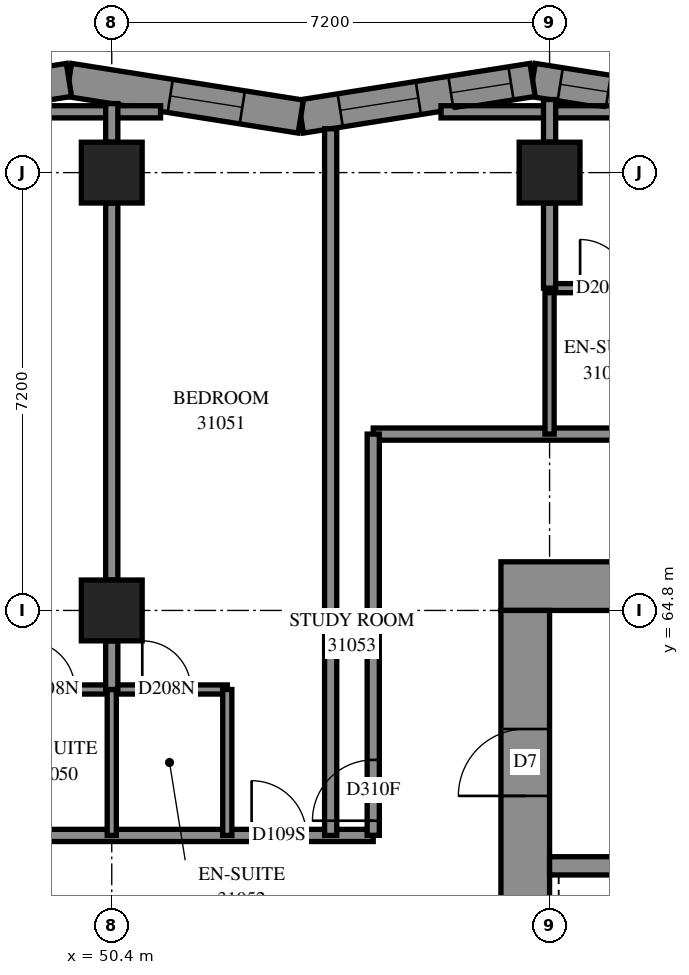
"""IFC4 building model, lengths in metres.
Left out: names, types, materials, properties, quantities, classifications, styles, units other than length and angle.
Written with IfcOpenShell. Run it as: python <this file> out.ifc"""

import sys

from ifc_helpers import new_model, si_unit, direction, frame, frame_2d, origin, origin_2d, place, context, subcontext, project, spatial, polyline, rectangle, outline, extrude, element, fill, save


model = new_model("IFC4")
c1 = context("Model", 3, precision=1e-05, world=origin(), true_north=direction((0.0, 1.0)))
c2 = subcontext(c1, "Body", "Model", "MODEL_VIEW")
j1 = project(units=[si_unit("LENGTHUNIT", "METRE"), si_unit("PLANEANGLEUNIT", "RADIAN")], contexts=[c1])
p1 = place(None, origin())
s1 = spatial("IfcSite", under=j1, at=p1, CompositionType="ELEMENT")
p2 = place(p1, origin())
s2 = spatial("IfcBuilding", under=s1, at=p2, CompositionType="ELEMENT")
p3 = place(p2, frame((0.0, 0.0, 115.2)))
s3 = spatial("IfcBuildingStorey", under=s2, at=p3, CompositionType="ELEMENT", Elevation=115.2)
for number, where, z_axis, x_axis in (
    (1, (50.4, 64.8, 0.0), (0.0, 0.0, 1.0), (1.0, 0.0, 0.0)),
    (2, (50.4, 72.0, 0.0), (0.0, 0.0, 1.0), (1.0, 0.0, 0.0)),
    (3, (57.6, 72.0, 0.0), (0.0, 0.0, 1.0), (1.0, 0.0, 0.0)),
):
    element("IfcColumn", number, at=place(p3, frame(where, z_axis=z_axis, x_axis=x_axis)), inside=s3, PredefinedType="COLUMN", context=c2, shape_type="SweptSolid", body=[
        extrude(rectangle(XDim=1.0, YDim=1.0, at=origin_2d()), origin(), (0.0, 0.0, 1.0), 3.1),
    ])
p4 = place(p3, frame((56.8, 65.2, -0.3), z_axis=(0.0, 0.0, 1.0), x_axis=(1.0, 0.0, 0.0)))
e4 = element("IfcWall", 4, at=p4, inside=s3, PredefinedType="SHEAR", context=c2, shape_type="SweptSolid", body=[
    extrude(rectangle(XDim=16.0, YDim=0.8, at=frame_2d((8.0, 0.0))), origin(), (0.0, 0.0, 1.0), 2.7),
])
p5 = place(p4, frame((10.8, 0.0, 0.3)))
e5 = element("IfcOpeningElement", 5, at=p5, cuts=e4, PredefinedType="OPENING", context=c2, shape_type="SweptSolid", body=[
    extrude(rectangle(XDim=0.8, YDim=2.1, at=frame_2d((0.4, 1.05))), frame((0.0, 0.41, 0.0), z_axis=(0.0, -1.0, 0.0), x_axis=(1.0, 0.0, 0.0)), (0.0, 0.0, 1.0), 0.82),
])
p6 = place(p3, frame((57.2, 50.4, -0.3), z_axis=(0.0, 0.0, 1.0), x_axis=(0.0, 1.0, 0.0)))
e6 = element("IfcWall", 6, at=p6, inside=s3, PredefinedType="SHEAR", context=c2, shape_type="SweptSolid", body=[
    extrude(rectangle(XDim=14.4, YDim=0.8, at=frame_2d((7.2, 0.0))), origin(), (0.0, 0.0, 1.0), 2.7),
])
p7 = place(p6, frame((4.55, 0.0, 0.3)))
e7 = element("IfcOpeningElement", 7, at=p7, cuts=e6, PredefinedType="OPENING", context=c2, shape_type="SweptSolid", body=[
    extrude(rectangle(XDim=1.1, YDim=2.1, at=frame_2d((0.55, 1.05))), frame((0.0, 0.41, 0.0), z_axis=(0.0, -1.0, 0.0), x_axis=(1.0, 0.0, 0.0)), (0.0, 0.0, 1.0), 0.82),
])
p8 = place(p6, frame((11.35, 0.0, 0.3)))
e8 = element("IfcOpeningElement", 8, at=p8, cuts=e6, PredefinedType="OPENING", context=c2, shape_type="SweptSolid", body=[
    extrude(rectangle(XDim=1.1, YDim=2.1, at=frame_2d((0.55, 1.05))), frame((0.0, 0.41, 0.0), z_axis=(0.0, -1.0, 0.0), x_axis=(1.0, 0.0, 0.0)), (0.0, 0.0, 1.0), 0.82),
])
p9 = place(p3, frame((57.6, 60.6, 0.0), z_axis=(0.0, 0.0, 1.0), x_axis=(1.0, 0.0, 0.0)))
e9 = element("IfcWall", 9, at=p9, inside=s3, PredefinedType="SOLIDWALL", context=c2, shape_type="SweptSolid", body=[
    extrude(rectangle(XDim=7.2, YDim=0.3, at=frame_2d((3.6, 0.0))), origin(), (0.0, 0.0, 1.0), 3.1),
])
p10 = place(p3, frame((61.133, 72.922, 0.0), z_axis=(0.0, 0.0, 1.0), x_axis=(-0.9877213372, 0.1562259905, 0.0)))
e10 = element("IfcWall", 10, at=p10, inside=s3, PredefinedType="SOLIDWALL", context=c2, shape_type="SweptSolid", body=[
    extrude(outline(polyline([(0.043, -0.275), (3.903, -0.275), (3.816, 0.275), (-0.043, 0.275), (0.043, -0.275)])), origin(), (0.0, 0.0, 1.0), 3.1),
])
p11 = place(p10, frame((0.508, 0.0, 0.5)))
e11 = element("IfcOpeningElement", 11, at=p11, cuts=e10, PredefinedType="OPENING", context=c2, shape_type="SweptSolid", body=[
    extrude(rectangle(XDim=1.3, YDim=2.45, at=frame_2d((0.65, 1.225))), frame((0.0, 0.285, 0.0), z_axis=(0.0, -1.0, 0.0), x_axis=(1.0, 0.0, 0.0)), (0.0, 0.0, 1.0), 0.57),
])
p12 = place(p10, frame((2.6, 0.0, 0.45)))
e12 = element("IfcOpeningElement", 12, at=p12, cuts=e10, PredefinedType="OPENING", context=c2, shape_type="SweptSolid", body=[
    extrude(rectangle(XDim=0.8, YDim=2.5, at=frame_2d((0.4, 1.25))), frame((0.0, 0.285, 0.0), z_axis=(0.0, -1.0, 0.0), x_axis=(1.0, 0.0, 0.0)), (0.0, 0.0, 1.0), 0.57),
])
p13 = place(p3, frame((57.321, 73.525, 0.0), z_axis=(0.0, 0.0, 1.0), x_axis=(-0.9877213372, -0.1562259905, 0.0)))
e13 = element("IfcWall", 13, at=p13, inside=s3, PredefinedType="SOLIDWALL", context=c2, shape_type="SweptSolid", body=[
    extrude(outline(polyline([(-0.043, -0.275), (3.816, -0.275), (3.903, 0.275), (0.043, 0.275), (-0.043, -0.275)])), origin(), (0.0, 0.0, 1.0), 3.1),
])
p14 = place(p13, frame((1.903, 0.0, 0.5)))
e14 = element("IfcOpeningElement", 14, at=p14, cuts=e13, PredefinedType="OPENING", context=c2, shape_type="SweptSolid", body=[
    extrude(rectangle(XDim=1.3, YDim=2.45, at=frame_2d((0.65, 1.225))), frame((0.0, 0.285, 0.0), z_axis=(0.0, -1.0, 0.0), x_axis=(1.0, 0.0, 0.0)), (0.0, 0.0, 1.0), 0.57),
])
p15 = place(p13, frame((0.36, 0.0, 0.45)))
e15 = element("IfcOpeningElement", 15, at=p15, cuts=e13, PredefinedType="OPENING", context=c2, shape_type="SweptSolid", body=[
    extrude(rectangle(XDim=1.0, YDim=2.5, at=frame_2d((0.5, 1.25))), frame((0.0, 0.285, 0.0), z_axis=(0.0, -1.0, 0.0), x_axis=(1.0, 0.0, 0.0)), (0.0, 0.0, 1.0), 0.57),
])
p16 = place(p3, frame((53.509, 72.922, 0.0), z_axis=(0.0, 0.0, 1.0), x_axis=(-0.9877213372, 0.1562259905, 0.0)))
e16 = element("IfcWall", 16, at=p16, inside=s3, PredefinedType="SOLIDWALL", context=c2, shape_type="SweptSolid", body=[
    extrude(outline(polyline([(0.043, -0.275), (3.903, -0.275), (3.816, 0.275), (-0.043, 0.275), (0.043, -0.275)])), origin(), (0.0, 0.0, 1.0), 3.1),
])
p17 = place(p16, frame((0.974, 0.0, 0.5)))
e17 = element("IfcOpeningElement", 17, at=p17, cuts=e16, PredefinedType="OPENING", context=c2, shape_type="SweptSolid", body=[
    extrude(rectangle(XDim=1.2, YDim=2.45, at=frame_2d((0.6, 1.225))), frame((0.0, 0.285, 0.0), z_axis=(0.0, -1.0, 0.0), x_axis=(1.0, 0.0, 0.0)), (0.0, 0.0, 1.0), 0.57),
])
p18 = place(p3, frame((49.696, 73.525, 0.0), z_axis=(0.0, 0.0, 1.0), x_axis=(-0.9877213372, -0.1562259905, 0.0)))
e18 = element("IfcWall", 18, at=p18, inside=s3, PredefinedType="SOLIDWALL", context=c2, shape_type="SweptSolid", body=[
    extrude(outline(polyline([(-0.043, -0.275), (3.816, -0.275), (3.903, 0.275), (0.043, 0.275), (-0.043, -0.275)])), origin(), (0.0, 0.0, 1.0), 3.1),
])
p19 = place(p18, frame((0.36, 0.0, 0.45)))
e19 = element("IfcOpeningElement", 19, at=p19, cuts=e18, PredefinedType="OPENING", context=c2, shape_type="SweptSolid", body=[
    extrude(rectangle(XDim=1.0, YDim=2.5, at=frame_2d((0.5, 1.25))), frame((0.0, 0.285, 0.0), z_axis=(0.0, -1.0, 0.0), x_axis=(1.0, 0.0, 0.0)), (0.0, 0.0, 1.0), 0.57),
])
p20 = place(p18, frame((2.04, 0.0, 0.45)))
e20 = element("IfcOpeningElement", 20, at=p20, cuts=e18, PredefinedType="OPENING", context=c2, shape_type="SweptSolid", body=[
    extrude(rectangle(XDim=0.8, YDim=2.5, at=frame_2d((0.4, 1.25))), frame((0.0, 0.285, 0.0), z_axis=(0.0, -1.0, 0.0), x_axis=(1.0, 0.0, 0.0)), (0.0, 0.0, 1.0), 0.57),
])
p21 = place(p3, frame((33.502, 61.1, 0.0), z_axis=(0.0, 0.0, 1.0), x_axis=(1.0, 0.0, 0.0)))
e21 = element("IfcWall", 21, at=p21, inside=s3, PredefinedType="PARTITIONING", context=c2, shape_type="SweptSolid", body=[
    extrude(rectangle(XDim=21.198, YDim=0.2, at=frame_2d((10.599, 0.0))), origin(), (0.0, 0.0, 1.0), 3.1),
])
p22 = place(p21, frame((4.798, 0.0, 0.0)))
e22 = element("IfcOpeningElement", 22, at=p22, cuts=e21, PredefinedType="OPENING", context=c2, shape_type="SweptSolid", body=[
    extrude(rectangle(XDim=0.9, YDim=2.1, at=frame_2d((0.45, 1.05))), frame((0.0, 0.11, 0.0), z_axis=(0.0, -1.0, 0.0), x_axis=(1.0, 0.0, 0.0)), (0.0, 0.0, 1.0), 0.22),
])
p23 = place(p21, frame((6.498, 0.0, 0.0)))
e23 = element("IfcOpeningElement", 23, at=p23, cuts=e21, PredefinedType="OPENING", context=c2, shape_type="SweptSolid", body=[
    extrude(rectangle(XDim=0.9, YDim=2.1, at=frame_2d((0.45, 1.05))), frame((0.0, 0.11, 0.0), z_axis=(0.0, -1.0, 0.0), x_axis=(1.0, 0.0, 0.0)), (0.0, 0.0, 1.0), 0.22),
])
p24 = place(p21, frame((11.998, 0.0, 0.0)))
e24 = element("IfcOpeningElement", 24, at=p24, cuts=e21, PredefinedType="OPENING", context=c2, shape_type="SweptSolid", body=[
    extrude(rectangle(XDim=0.9, YDim=2.1, at=frame_2d((0.45, 1.05))), frame((0.0, 0.11, 0.0), z_axis=(0.0, -1.0, 0.0), x_axis=(1.0, 0.0, 0.0)), (0.0, 0.0, 1.0), 0.22),
])
p25 = place(p21, frame((13.698, 0.0, 0.0)))
e25 = element("IfcOpeningElement", 25, at=p25, cuts=e21, PredefinedType="OPENING", context=c2, shape_type="SweptSolid", body=[
    extrude(rectangle(XDim=0.9, YDim=2.1, at=frame_2d((0.45, 1.05))), frame((0.0, 0.11, 0.0), z_axis=(0.0, -1.0, 0.0), x_axis=(1.0, 0.0, 0.0)), (0.0, 0.0, 1.0), 0.22),
])
p26 = place(p21, frame((19.198, 0.0, 0.0)))
e26 = element("IfcOpeningElement", 26, at=p26, cuts=e21, PredefinedType="OPENING", context=c2, shape_type="SweptSolid", body=[
    extrude(rectangle(XDim=0.9, YDim=2.1, at=frame_2d((0.45, 1.05))), frame((0.0, 0.11, 0.0), z_axis=(0.0, -1.0, 0.0), x_axis=(1.0, 0.0, 0.0)), (0.0, 0.0, 1.0), 0.22),
])
p27 = place(p3, frame((54.7, 67.7, 0.0), z_axis=(0.0, 0.0, 1.0), x_axis=(1.0, 0.0, 0.0)))
e27 = element("IfcWall", 27, at=p27, inside=s3, PredefinedType="PARTITIONING", context=c2, shape_type="SweptSolid", body=[
    extrude(rectangle(XDim=20.2, YDim=0.2, at=frame_2d((10.1, 0.0))), origin(), (0.0, 0.0, 1.0), 3.1),
])
p28 = place(p27, frame((5.2, 0.0, 0.0)))
e28 = element("IfcOpeningElement", 28, at=p28, cuts=e27, PredefinedType="OPENING", context=c2, shape_type="SweptSolid", body=[
    extrude(rectangle(XDim=0.9, YDim=2.1, at=frame_2d((0.45, 1.05))), frame((0.0, 0.11, 0.0), z_axis=(0.0, -1.0, 0.0), x_axis=(1.0, 0.0, 0.0)), (0.0, 0.0, 1.0), 0.22),
])
p29 = place(p27, frame((8.838, 0.0, 0.0)))
e29 = element("IfcOpeningElement", 29, at=p29, cuts=e27, PredefinedType="OPENING", context=c2, shape_type="SweptSolid", body=[
    extrude(rectangle(XDim=1.0, YDim=2.1, at=frame_2d((0.5, 1.05))), frame((0.0, 0.11, 0.0), z_axis=(0.0, -1.0, 0.0), x_axis=(1.0, 0.0, 0.0)), (0.0, 0.0, 1.0), 0.22),
])
p30 = place(p27, frame((14.1, 0.0, 0.0)))
e30 = element("IfcOpeningElement", 30, at=p30, cuts=e27, PredefinedType="OPENING", context=c2, shape_type="SweptSolid", body=[
    extrude(rectangle(XDim=0.9, YDim=2.1, at=frame_2d((0.45, 1.05))), frame((0.0, 0.11, 0.0), z_axis=(0.0, -1.0, 0.0), x_axis=(1.0, 0.0, 0.0)), (0.0, 0.0, 1.0), 0.22),
])
p31 = place(p3, frame((54.0, 61.1, 0.0), z_axis=(0.0, 0.0, 1.0), x_axis=(0.0, 1.0, 0.0)))
e31 = element("IfcWall", 31, at=p31, inside=s3, PredefinedType="PARTITIONING", context=c2, shape_type="SweptSolid", body=[
    extrude(rectangle(XDim=11.621, YDim=0.2, at=frame_2d((5.811, 0.0))), origin(), (0.0, 0.0, 1.0), 3.1),
])
p32 = place(p3, frame((54.7, 61.102, 0.0), z_axis=(0.0, 0.0, 1.0), x_axis=(0.0, 1.0, 0.0)))
e32 = element("IfcWall", 32, at=p32, inside=s3, PredefinedType="PARTITIONING", context=c2, shape_type="SweptSolid", body=[
    extrude(rectangle(XDim=6.598, YDim=0.2, at=frame_2d((3.299, 0.0))), origin(), (0.0, 0.0, 1.0), 3.1),
])
p33 = place(p32, frame((0.24, 0.0, 0.0)))
e33 = element("IfcOpeningElement", 33, at=p33, cuts=e32, PredefinedType="OPENING", context=c2, shape_type="SweptSolid", body=[
    extrude(rectangle(XDim=1.0, YDim=2.1, at=frame_2d((0.5, 1.05))), frame((0.0, 0.11, 0.0), z_axis=(0.0, -1.0, 0.0), x_axis=(1.0, 0.0, 0.0)), (0.0, 0.0, 1.0), 0.22),
])
p34 = place(p3, frame((50.4, 65.3, 0.0), z_axis=(0.0, 0.0, 1.0), x_axis=(0.0, 1.0, 0.0)))
e34 = element("IfcWall", 34, at=p34, inside=s3, PredefinedType="PARTITIONING", context=c2, shape_type="SweptSolid", body=[
    extrude(rectangle(XDim=6.2, YDim=0.2, at=frame_2d((3.1, 0.0))), origin(), (0.0, 0.0, 1.0), 3.1),
])
p35 = place(p3, frame((48.5, 63.5, 0.0), z_axis=(0.0, 0.0, 1.0), x_axis=(1.0, 0.0, 0.0)))
e35 = element("IfcWall", 35, at=p35, inside=s3, PredefinedType="PARTITIONING", context=c2, shape_type="SweptSolid", body=[
    extrude(rectangle(XDim=3.8, YDim=0.15, at=frame_2d((1.9, 0.0))), origin(), (0.0, 0.0, 1.0), 3.1),
])
p36 = place(p35, frame((0.493, 0.0, 0.0)))
e36 = element("IfcOpeningElement", 36, at=p36, cuts=e35, PredefinedType="OPENING", context=c2, shape_type="SweptSolid", body=[
    extrude(rectangle(XDim=0.8, YDim=2.1, at=frame_2d((0.4, 1.05))), frame((0.0, 0.085, 0.0), z_axis=(0.0, -1.0, 0.0), x_axis=(1.0, 0.0, 0.0)), (0.0, 0.0, 1.0), 0.17),
])
p37 = place(p35, frame((2.402, 0.0, 0.0)))
e37 = element("IfcOpeningElement", 37, at=p37, cuts=e35, PredefinedType="OPENING", context=c2, shape_type="SweptSolid", body=[
    extrude(rectangle(XDim=0.8, YDim=2.1, at=frame_2d((0.4, 1.05))), frame((0.0, 0.085, 0.0), z_axis=(0.0, -1.0, 0.0), x_axis=(1.0, 0.0, 0.0)), (0.0, 0.0, 1.0), 0.17),
])
for number, where, z_axis, x_axis in (
    (38, (48.19, 73.0, 0.0), (0.0, 0.0, 1.0), (1.0, 0.0, 0.0)),
    (39, (55.815, 73.0, 0.0), (0.0, 0.0, 1.0), (1.0, 0.0, 0.0)),
):
    element("IfcWall", number, at=place(p3, frame(where, z_axis=z_axis, x_axis=x_axis)), inside=s3, PredefinedType="PARTITIONING", context=c2, shape_type="SweptSolid", body=[
        extrude(rectangle(XDim=3.013, YDim=0.2, at=frame_2d((1.506, 0.0))), origin(), (0.0, 0.0, 1.0), 3.1),
    ])
for number, where, z_axis, x_axis in (
    (40, (50.4, 61.1, 0.0), (0.0, 0.0, 1.0), (0.0, 1.0, 0.0)),
    (41, (52.3, 61.1, 0.0), (0.0, 0.0, 1.0), (0.0, 1.0, 0.0)),
    (42, (57.6, 67.7, 0.0), (0.0, 0.0, 1.0), (0.0, 1.0, 0.0)),
):
    element("IfcWall", number, at=place(p3, frame(where, z_axis=z_axis, x_axis=x_axis)), inside=s3, PredefinedType="PARTITIONING", context=c2, shape_type="SweptSolid", body=[
        extrude(rectangle(XDim=2.4, YDim=0.15, at=frame_2d((1.2, 0.0))), origin(), (0.0, 0.0, 1.0), 3.1),
    ])
p38 = place(p3, frame((57.6, 70.1, 0.0), z_axis=(0.0, 0.0, 1.0), x_axis=(1.0, 0.0, 0.0)))
e43 = element("IfcWall", 43, at=p38, inside=s3, PredefinedType="PARTITIONING", context=c2, shape_type="SweptSolid", body=[
    extrude(rectangle(XDim=1.9, YDim=0.15, at=frame_2d((0.95, 0.0))), origin(), (0.0, 0.0, 1.0), 3.1),
])
p39 = place(p38, frame((0.502, 0.0, 0.0)))
e44 = element("IfcOpeningElement", 44, at=p39, cuts=e43, PredefinedType="OPENING", context=c2, shape_type="SweptSolid", body=[
    extrude(rectangle(XDim=0.8, YDim=2.1, at=frame_2d((0.4, 1.05))), frame((0.0, 0.085, 0.0), z_axis=(0.0, -1.0, 0.0), x_axis=(1.0, 0.0, 0.0)), (0.0, 0.0, 1.0), 0.17),
])
p40 = place(p3, frame((57.6, 70.1, 0.0), z_axis=(0.0, 0.0, 1.0), x_axis=(0.0, 1.0, 0.0)))
e45 = element("IfcWall", 45, at=p40, inside=s3, PredefinedType="PARTITIONING", context=c2, shape_type="SweptSolid", body=[
    extrude(rectangle(XDim=1.4, YDim=0.2, at=frame_2d((0.7, 0.0))), origin(), (0.0, 0.0, 1.0), 3.1),
])
p41 = place(p3, frame((50.4, 63.5, 0.0), z_axis=(0.0, 0.0, 1.0), x_axis=(0.0, 1.0, 0.0)))
e46 = element("IfcWall", 46, at=p41, inside=s3, PredefinedType="PARTITIONING", context=c2, shape_type="SweptSolid", body=[
    extrude(rectangle(XDim=0.8, YDim=0.2, at=frame_2d((0.4, 0.0))), origin(), (0.0, 0.0, 1.0), 3.1),
])
p42 = place(p3, frame((50.4, 72.5, 0.0), z_axis=(0.0, 0.0, 1.0), x_axis=(0.0, 1.0, 0.0)))
e47 = element("IfcWall", 47, at=p42, inside=s3, PredefinedType="PARTITIONING", context=c2, shape_type="SweptSolid", body=[
    extrude(rectangle(XDim=0.635, YDim=0.2, at=frame_2d((0.317, 0.0))), origin(), (0.0, 0.0, 1.0), 3.1),
])
p43 = place(p3, frame((57.6, 72.5, 0.0), z_axis=(0.0, 0.0, 1.0), x_axis=(0.0, 1.0, 0.0)))
e48 = element("IfcWall", 48, at=p43, inside=s3, PredefinedType="PARTITIONING", context=c2, shape_type="SweptSolid", body=[
    extrude(rectangle(XDim=0.702, YDim=0.2, at=frame_2d((0.351, 0.0))), origin(), (0.0, 0.0, 1.0), 3.1),
])
p44 = place(p14, origin())
e49 = element("IfcWindow", 49, at=p44, inside=s3, PartitioningType="SINGLE_PANEL", PredefinedType="WINDOW", context=c2, shape_type="SweptSolid", body=[
    extrude(rectangle(XDim=1.3, YDim=2.45, at=frame_2d((0.65, 1.225))), frame((0.0, 0.155, 0.0), z_axis=(0.0, -1.0, 0.0), x_axis=(1.0, 0.0, 0.0)), (0.0, 0.0, 1.0), 0.06),
])
fill(e14, e49)
p45 = place(p17, origin())
e50 = element("IfcWindow", 50, at=p45, inside=s3, PartitioningType="SINGLE_PANEL", PredefinedType="WINDOW", context=c2, shape_type="SweptSolid", body=[
    extrude(rectangle(XDim=1.2, YDim=2.45, at=frame_2d((0.6, 1.225))), frame((0.0, 0.155, 0.0), z_axis=(0.0, -1.0, 0.0), x_axis=(1.0, 0.0, 0.0)), (0.0, 0.0, 1.0), 0.06),
])
fill(e17, e50)
p46 = place(p8, origin())
e51 = element("IfcDoor", 51, at=p46, inside=s3, OperationType="SINGLE_SWING_LEFT", PredefinedType="DOOR", context=c2, shape_type="SweptSolid", body=[
    extrude(rectangle(XDim=1.1, YDim=2.1, at=frame_2d((0.55, 1.05))), frame((0.0, 0.025, 0.0), z_axis=(0.0, -1.0, 0.0), x_axis=(1.0, 0.0, 0.0)), (0.0, 0.0, 1.0), 0.05),
])
fill(e8, e51)
p47 = place(p36, origin())
e52 = element("IfcDoor", 52, at=p47, inside=s3, OperationType="SINGLE_SWING_RIGHT", PredefinedType="DOOR", context=c2, shape_type="SweptSolid", body=[
    extrude(rectangle(XDim=0.8, YDim=2.1, at=frame_2d((0.4, 1.05))), frame((0.0, 0.025, 0.0), z_axis=(0.0, -1.0, 0.0), x_axis=(1.0, 0.0, 0.0)), (0.0, 0.0, 1.0), 0.05),
])
fill(e36, e52)
p48 = place(p26, origin())
e53 = element("IfcDoor", 53, at=p48, inside=s3, OperationType="SINGLE_SWING_RIGHT", PredefinedType="DOOR", context=c2, shape_type="SweptSolid", body=[
    extrude(rectangle(XDim=0.9, YDim=2.1, at=frame_2d((0.45, 1.05))), frame((0.0, 0.025, 0.0), z_axis=(0.0, -1.0, 0.0), x_axis=(1.0, 0.0, 0.0)), (0.0, 0.0, 1.0), 0.05),
])
fill(e26, e53)
p49 = place(p37, origin())
e54 = element("IfcDoor", 54, at=p49, inside=s3, OperationType="SINGLE_SWING_RIGHT", PredefinedType="DOOR", context=c2, shape_type="SweptSolid", body=[
    extrude(rectangle(XDim=0.8, YDim=2.1, at=frame_2d((0.4, 1.05))), frame((0.0, 0.025, 0.0), z_axis=(0.0, -1.0, 0.0), x_axis=(1.0, 0.0, 0.0)), (0.0, 0.0, 1.0), 0.05),
])
fill(e37, e54)
p50 = place(p33, origin())
e55 = element("IfcDoor", 55, at=p50, inside=s3, OperationType="SINGLE_SWING_LEFT", PredefinedType="DOOR", context=c2, shape_type="SweptSolid", body=[
    extrude(rectangle(XDim=1.0, YDim=2.1, at=frame_2d((0.5, 1.05))), frame((0.0, 0.025, 0.0), z_axis=(0.0, -1.0, 0.0), x_axis=(1.0, 0.0, 0.0)), (0.0, 0.0, 1.0), 0.05),
])
fill(e33, e55)
p51 = place(p39, origin())
e56 = element("IfcDoor", 56, at=p51, inside=s3, OperationType="SINGLE_SWING_RIGHT", PredefinedType="DOOR", context=c2, shape_type="SweptSolid", body=[
    extrude(rectangle(XDim=0.8, YDim=2.1, at=frame_2d((0.4, 1.05))), frame((0.0, 0.025, 0.0), z_axis=(0.0, -1.0, 0.0), x_axis=(1.0, 0.0, 0.0)), (0.0, 0.0, 1.0), 0.05),
])
fill(e44, e56)
p52 = place(p12, origin())
e57 = element("IfcWindow", 57, at=p52, inside=s3, PartitioningType="SINGLE_PANEL", PredefinedType="WINDOW", context=c2, shape_type="SweptSolid", body=[
    extrude(rectangle(XDim=0.8, YDim=2.5, at=frame_2d((0.4, 1.25))), frame((0.0, 0.155, 0.0), z_axis=(0.0, -1.0, 0.0), x_axis=(1.0, 0.0, 0.0)), (0.0, 0.0, 1.0), 0.06),
])
fill(e12, e57)
p53 = place(p15, origin())
e58 = element("IfcWindow", 58, at=p53, inside=s3, PartitioningType="SINGLE_PANEL", PredefinedType="WINDOW", context=c2, shape_type="SweptSolid", body=[
    extrude(rectangle(XDim=1.0, YDim=2.5, at=frame_2d((0.5, 1.25))), frame((0.0, 0.155, 0.0), z_axis=(0.0, -1.0, 0.0), x_axis=(1.0, 0.0, 0.0)), (0.0, 0.0, 1.0), 0.06),
])
fill(e15, e58)
save(model, sys.argv[1])
